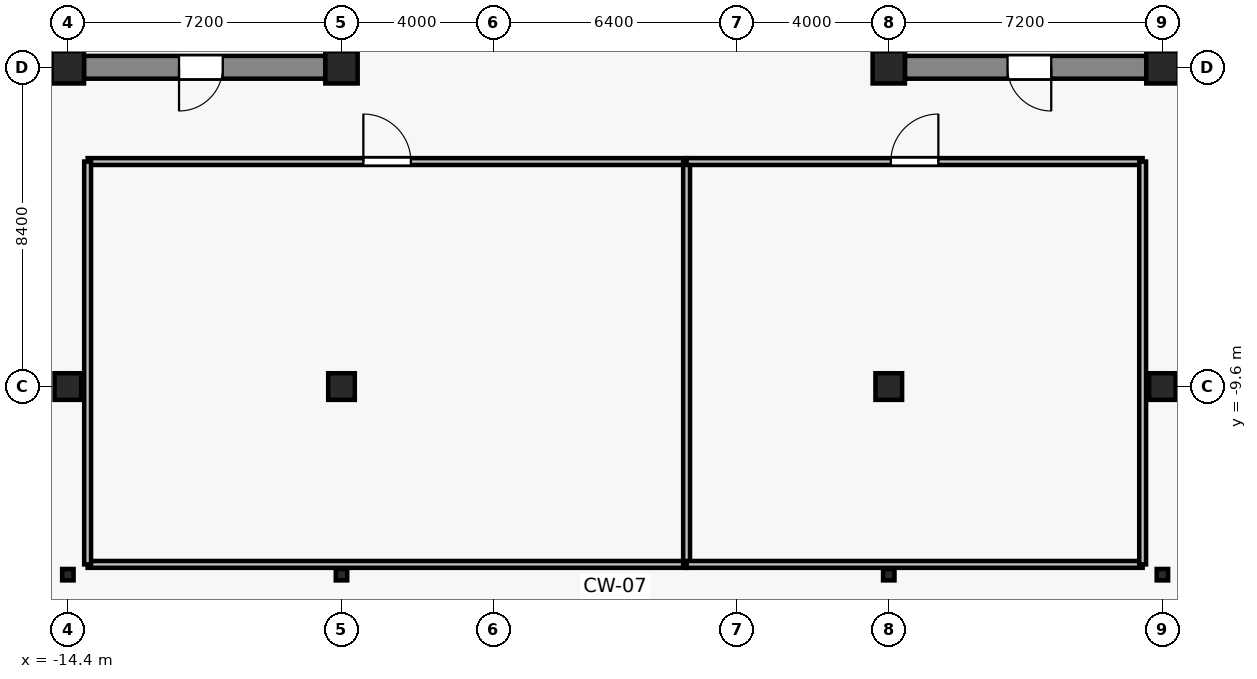
"""IFC4 building model, lengths in metres.
Left out: names, types, materials, properties, quantities, classifications, styles, units other than length and angle.
Written with IfcOpenShell. Run it as: python <this file> out.ifc"""

import sys

from ifc_helpers import new_model, si_unit, direction, frame, frame_2d, origin, origin_2d, place, context, subcontext, project, spatial, rectangle, i_section, extrude, source, transform, mapped, element, fill, save


model = new_model("IFC4")
c1 = context("Model", 3, precision=1e-05, world=origin(), true_north=direction((0.0, 1.0)))
c2 = subcontext(c1, "Body", "Model", "MODEL_VIEW")
j1 = project(units=[si_unit("LENGTHUNIT", "METRE"), si_unit("PLANEANGLEUNIT", "RADIAN")], contexts=[c1])
p1 = place(None, origin())
s1 = spatial("IfcSite", under=j1, at=p1, CompositionType="ELEMENT")
p2 = place(p1, origin())
s2 = spatial("IfcBuilding", under=s1, at=p2, CompositionType="ELEMENT")
p3 = place(p2, frame((0.0, 0.0, 285.4)))
s3 = spatial("IfcBuildingStorey", under=s2, at=p3, CompositionType="ELEMENT", Elevation=285.4)
for number, where, z_axis, x_axis in (
    (1, (-14.4, -1.2, 0.0), (0.0, 0.0, 1.0), (1.0, 0.0, 0.0)),
    (2, (-7.2, -1.2, 0.0), (0.0, 0.0, 1.0), (1.0, 0.0, 0.0)),
    (3, (7.2, -1.2, 0.0), (0.0, 0.0, 1.0), (1.0, 0.0, 0.0)),
    (4, (14.4, -1.2, 0.0), (0.0, 0.0, 1.0), (1.0, 0.0, 0.0)),
):
    element("IfcColumn", number, at=place(p3, frame(where, z_axis=z_axis, x_axis=x_axis)), inside=s3, PredefinedType="COLUMN", context=c2, shape_type="SweptSolid", body=[
        extrude(rectangle(XDim=0.85, YDim=0.85, at=origin_2d()), origin(), (0.0, 0.0, 1.0), 4.6),
    ])
p4 = place(p3, frame((-14.4, -9.6, 0.0), z_axis=(0.0, 0.0, 1.0), x_axis=(1.0, 0.0, 0.0)))
e5 = element("IfcColumn", 5, at=p4, inside=s3, PredefinedType="COLUMN", context=c2, shape_type="SweptSolid", body=[
    extrude(rectangle(XDim=0.7, YDim=0.7, at=origin_2d()), origin(), (0.0, 0.0, 1.0), 4.6),
])
p5 = place(p3, frame((-14.4, -14.55, 0.0), z_axis=(0.0, 0.0, 1.0), x_axis=(1.0, 0.0, 0.0)))
e6 = element("IfcColumn", 6, at=p5, inside=s3, PredefinedType="COLUMN", context=c2, shape_type="SweptSolid", body=[
    extrude(i_section(OverallWidth=0.3, OverallDepth=0.3, WebThickness=0.011, FlangeThickness=0.019, FilletRadius=0.027, at=origin_2d()), origin(), (0.0, 0.0, 1.0), 4.6),
])
p6 = place(p3, frame((-7.2, -9.6, 0.0), z_axis=(0.0, 0.0, 1.0), x_axis=(1.0, 0.0, 0.0)))
e7 = element("IfcColumn", 7, at=p6, inside=s3, PredefinedType="COLUMN", context=c2, shape_type="SweptSolid", body=[
    extrude(rectangle(XDim=0.7, YDim=0.7, at=origin_2d()), origin(), (0.0, 0.0, 1.0), 4.6),
])
p7 = place(p3, frame((-7.2, -14.55, 0.0), z_axis=(0.0, 0.0, 1.0), x_axis=(1.0, 0.0, 0.0)))
e8 = element("IfcColumn", 8, at=p7, inside=s3, PredefinedType="COLUMN", context=c2, shape_type="SweptSolid", body=[
    extrude(i_section(OverallWidth=0.3, OverallDepth=0.3, WebThickness=0.011, FlangeThickness=0.019, FilletRadius=0.027, at=origin_2d()), origin(), (0.0, 0.0, 1.0), 4.6),
])
p8 = place(p3, frame((7.2, -9.6, 0.0), z_axis=(0.0, 0.0, 1.0), x_axis=(1.0, 0.0, 0.0)))
e9 = element("IfcColumn", 9, at=p8, inside=s3, PredefinedType="COLUMN", context=c2, shape_type="SweptSolid", body=[
    extrude(rectangle(XDim=0.7, YDim=0.7, at=origin_2d()), origin(), (0.0, 0.0, 1.0), 4.6),
])
p9 = place(p3, frame((7.2, -14.55, 0.0), z_axis=(0.0, 0.0, 1.0), x_axis=(1.0, 0.0, 0.0)))
e10 = element("IfcColumn", 10, at=p9, inside=s3, PredefinedType="COLUMN", context=c2, shape_type="SweptSolid", body=[
    extrude(i_section(OverallWidth=0.3, OverallDepth=0.3, WebThickness=0.011, FlangeThickness=0.019, FilletRadius=0.027, at=origin_2d()), origin(), (0.0, 0.0, 1.0), 4.6),
])
p10 = place(p3, frame((14.4, -9.6, 0.0), z_axis=(0.0, 0.0, 1.0), x_axis=(1.0, 0.0, 0.0)))
e11 = element("IfcColumn", 11, at=p10, inside=s3, PredefinedType="COLUMN", context=c2, shape_type="SweptSolid", body=[
    extrude(rectangle(XDim=0.7, YDim=0.7, at=origin_2d()), origin(), (0.0, 0.0, 1.0), 4.6),
])
p11 = place(p3, frame((14.4, -14.55, 0.0), z_axis=(0.0, 0.0, 1.0), x_axis=(1.0, 0.0, 0.0)))
e12 = element("IfcColumn", 12, at=p11, inside=s3, PredefinedType="COLUMN", context=c2, shape_type="SweptSolid", body=[
    extrude(i_section(OverallWidth=0.3, OverallDepth=0.3, WebThickness=0.011, FlangeThickness=0.019, FilletRadius=0.027, at=origin_2d()), origin(), (0.0, 0.0, 1.0), 4.6),
])
p12 = place(p3, frame((-7.625, -1.2, 0.0), z_axis=(0.0, 0.0, 1.0), x_axis=(-1.0, 0.0, 0.0)))
e13 = element("IfcWall", 13, at=p12, inside=s3, PredefinedType="SHEAR", context=c2, shape_type="SweptSolid", body=[
    extrude(rectangle(XDim=6.35, YDim=0.6, at=frame_2d((3.175, 0.0))), origin(), (0.0, 0.0, 1.0), 4.38),
])
p13 = place(p12, frame((2.7, 0.0, 0.0)))
e14 = element("IfcOpeningElement", 14, at=p13, cuts=e13, PredefinedType="OPENING", context=c2, shape_type="SweptSolid", body=[
    extrude(rectangle(XDim=1.15, YDim=2.15, at=frame_2d((0.575, 1.075))), frame((0.0, 0.31, 0.0), z_axis=(0.0, -1.0, 0.0), x_axis=(1.0, 0.0, 0.0)), (0.0, 0.0, 1.0), 0.62),
])
p14 = place(p3, frame((13.975, -1.2, 0.0), z_axis=(0.0, 0.0, 1.0), x_axis=(-1.0, 0.0, 0.0)))
e15 = element("IfcWall", 15, at=p14, inside=s3, PredefinedType="SHEAR", context=c2, shape_type="SweptSolid", body=[
    extrude(rectangle(XDim=6.35, YDim=0.6, at=frame_2d((3.175, 0.0))), origin(), (0.0, 0.0, 1.0), 4.38),
])
p15 = place(p14, frame((2.5, 0.0, 0.0)))
e16 = element("IfcOpeningElement", 16, at=p15, cuts=e15, PredefinedType="OPENING", context=c2, shape_type="SweptSolid", body=[
    extrude(rectangle(XDim=1.15, YDim=2.15, at=frame_2d((0.575, 1.075))), frame((0.0, 0.31, 0.0), z_axis=(0.0, -1.0, 0.0), x_axis=(1.0, 0.0, 0.0)), (0.0, 0.0, 1.0), 0.62),
])
for number, where, z_axis, x_axis in (
    (17, (-7.4, -0.9, 0.0), (0.0, 0.0, 1.0), (0.0, 1.0, 0.0)),
    (18, (7.4, -0.9, 0.0), (0.0, 0.0, 1.0), (0.0, 1.0, 0.0)),
):
    element("IfcWall", number, at=place(p3, frame(where, z_axis=z_axis, x_axis=x_axis)), inside=s3, PredefinedType="SHEAR", context=c2, shape_type="SweptSolid", body=[
        extrude(rectangle(XDim=4.15, YDim=0.45, at=frame_2d((2.075, 0.0))), origin(), (0.0, 0.0, 1.0), 4.38),
    ])
p16 = place(p3, frame((1.88, -14.28, 0.0), z_axis=(0.0, 0.0, 1.0), x_axis=(-1.0, 0.0, 0.0)))
e19 = element("IfcWall", 19, at=p16, inside=s3, PredefinedType="PARTITIONING", context=c2, shape_type="SweptSolid", body=[
    extrude(rectangle(XDim=15.76, YDim=0.18, at=frame_2d((7.88, 0.0))), origin(), (0.0, 0.0, 1.0), 3.77),
])
p17 = place(p3, frame((-13.88, -3.68, 0.0), z_axis=(0.0, 0.0, 1.0), x_axis=(1.0, 0.0, 0.0)))
e20 = element("IfcWall", 20, at=p17, inside=s3, PredefinedType="PARTITIONING", context=c2, shape_type="SweptSolid", body=[
    extrude(rectangle(XDim=15.76, YDim=0.18, at=frame_2d((7.88, 0.0))), origin(), (0.0, 0.0, 1.0), 3.77),
])
p18 = place(p17, frame((7.255, 0.0, 0.0)))
e21 = element("IfcOpeningElement", 21, at=p18, cuts=e20, PredefinedType="OPENING", context=c2, shape_type="SweptSolid", body=[
    extrude(rectangle(XDim=1.25, YDim=2.15, at=frame_2d((0.625, 1.075))), frame((0.0, 0.1, 0.0), z_axis=(0.0, -1.0, 0.0), x_axis=(1.0, 0.0, 0.0)), (0.0, 0.0, 1.0), 0.2),
])
for number, where, z_axis, x_axis in (
    (22, (-13.88, -14.28, 0.0), (0.0, 0.0, 1.0), (0.0, 1.0, 0.0)),
    (23, (1.88, -3.68, 0.0), (0.0, 0.0, 1.0), (0.0, -1.0, 0.0)),
):
    element("IfcWall", number, at=place(p3, frame(where, z_axis=z_axis, x_axis=x_axis)), inside=s3, PredefinedType="PARTITIONING", context=c2, shape_type="SweptSolid", body=[
        extrude(rectangle(XDim=10.6, YDim=0.18, at=frame_2d((5.3, 0.0))), origin(), (0.0, 0.0, 1.0), 3.77),
    ])
p19 = place(p3, frame((13.88, -14.28, 0.0), z_axis=(0.0, 0.0, 1.0), x_axis=(-1.0, 0.0, 0.0)))
e24 = element("IfcWall", 24, at=p19, inside=s3, PredefinedType="PARTITIONING", context=c2, shape_type="SweptSolid", body=[
    extrude(rectangle(XDim=12.0, YDim=0.18, at=frame_2d((6.0, 0.0))), origin(), (0.0, 0.0, 1.0), 3.77),
])
p20 = place(p3, frame((1.88, -3.68, 0.0), z_axis=(0.0, 0.0, 1.0), x_axis=(1.0, 0.0, 0.0)))
e25 = element("IfcWall", 25, at=p20, inside=s3, PredefinedType="PARTITIONING", context=c2, shape_type="SweptSolid", body=[
    extrude(rectangle(XDim=12.0, YDim=0.18, at=frame_2d((6.0, 0.0))), origin(), (0.0, 0.0, 1.0), 3.77),
])
p21 = place(p20, frame((5.375, 0.0, 0.0)))
e26 = element("IfcOpeningElement", 26, at=p21, cuts=e25, PredefinedType="OPENING", context=c2, shape_type="SweptSolid", body=[
    extrude(rectangle(XDim=1.25, YDim=2.15, at=frame_2d((0.625, 1.075))), frame((0.0, 0.1, 0.0), z_axis=(0.0, -1.0, 0.0), x_axis=(1.0, 0.0, 0.0)), (0.0, 0.0, 1.0), 0.2),
])
p22 = place(p3, frame((13.88, -3.68, 0.0), z_axis=(0.0, 0.0, 1.0), x_axis=(0.0, -1.0, 0.0)))
e27 = element("IfcWall", 27, at=p22, inside=s3, PredefinedType="PARTITIONING", context=c2, shape_type="SweptSolid", body=[
    extrude(rectangle(XDim=10.6, YDim=0.18, at=frame_2d((5.3, 0.0))), origin(), (0.0, 0.0, 1.0), 3.77),
])
m1 = source(origin(), c2, "Body", "SweptSolid", [
    extrude(rectangle(XDim=1.15, YDim=2.15, at=frame_2d((0.575, 1.075))), frame((0.0, 0.025, 0.0), z_axis=(0.0, -1.0, 0.0), x_axis=(1.0, 0.0, 0.0)), (0.0, 0.0, 1.0), 0.05),
])
p23 = place(p13, origin())
e28 = element("IfcDoor", 28, at=p23, inside=s3, OperationType="SINGLE_SWING_RIGHT", PredefinedType="DOOR", context=c2, shape_type="MappedRepresentation", body=[
    mapped(m1, transform((0.0, 0.0, 0.0), x_axis=(1.0, 0.0, 0.0), y_axis=(0.0, 1.0, 0.0), z_axis=(0.0, 0.0, 1.0), scale=1.0)),
])
fill(e14, e28)
p24 = place(p15, origin())
e29 = element("IfcDoor", 29, at=p24, inside=s3, OperationType="SINGLE_SWING_LEFT", PredefinedType="DOOR", context=c2, shape_type="MappedRepresentation", body=[
    mapped(m1, transform((0.0, 0.0, 0.0), x_axis=(1.0, 0.0, 0.0), y_axis=(0.0, 1.0, 0.0), z_axis=(0.0, 0.0, 1.0), scale=1.0)),
])
fill(e16, e29)
m2 = source(origin(), c2, "Body", "SweptSolid", [
    extrude(rectangle(XDim=1.25, YDim=2.15, at=frame_2d((0.625, 1.075))), frame((0.0, 0.025, 0.0), z_axis=(0.0, -1.0, 0.0), x_axis=(1.0, 0.0, 0.0)), (0.0, 0.0, 1.0), 0.05),
])
p25 = place(p18, origin())
e30 = element("IfcDoor", 30, at=p25, inside=s3, OperationType="SINGLE_SWING_LEFT", PredefinedType="DOOR", context=c2, shape_type="MappedRepresentation", body=[
    mapped(m2, transform((0.0, 0.0, 0.0), x_axis=(1.0, 0.0, 0.0), y_axis=(0.0, 1.0, 0.0), z_axis=(0.0, 0.0, 1.0), scale=1.0)),
])
fill(e21, e30)
p26 = place(p21, origin())
e31 = element("IfcDoor", 31, at=p26, inside=s3, OperationType="SINGLE_SWING_RIGHT", PredefinedType="DOOR", context=c2, shape_type="MappedRepresentation", body=[
    mapped(m2, transform((0.0, 0.0, 0.0), x_axis=(1.0, 0.0, 0.0), y_axis=(0.0, 1.0, 0.0), z_axis=(0.0, 0.0, 1.0), scale=1.0)),
])
fill(e26, e31)
save(model, sys.argv[1])
